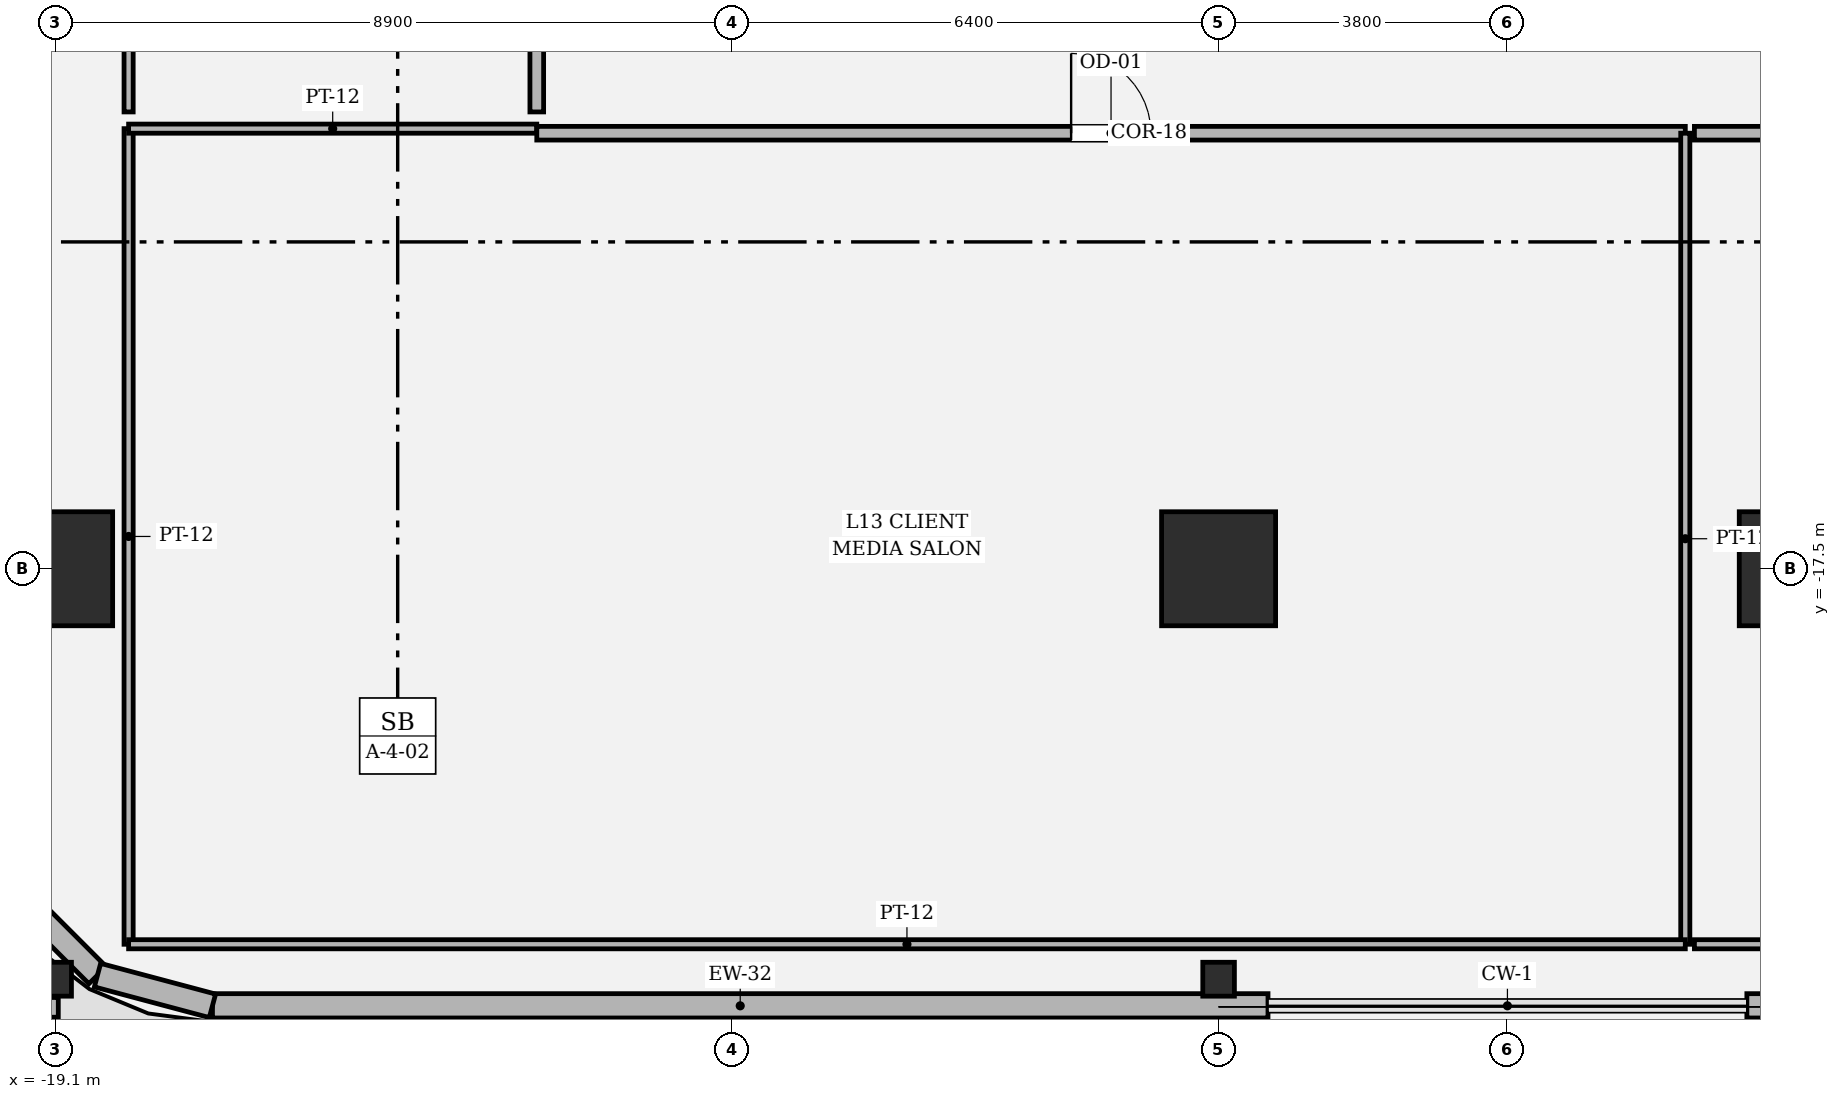
"""IFC4 building model, lengths in metres.
Left out: names, types, materials, properties, quantities, classifications, styles, units other than length and angle.
Written with IfcOpenShell. Run it as: python <this file> out.ifc"""

import sys

from ifc_helpers import new_model, si_unit, direction, frame, frame_2d, origin, origin_2d, place, context, subcontext, project, spatial, rectangle, hollow_rectangle, i_section, extrude, element, fill, save


model = new_model("IFC4")
c1 = context("Model", 3, precision=1e-05, world=origin(), true_north=direction((0.0, 1.0)))
c2 = subcontext(c1, "Body", "Model", "MODEL_VIEW")
j1 = project(units=[si_unit("LENGTHUNIT", "METRE"), si_unit("PLANEANGLEUNIT", "RADIAN")], contexts=[c1])
p1 = place(None, origin())
s1 = spatial("IfcSite", under=j1, at=p1, CompositionType="ELEMENT")
p2 = place(p1, origin())
s2 = spatial("IfcBuilding", under=s1, at=p2, CompositionType="ELEMENT")
p3 = place(p2, frame((0.0, 0.0, 60.6)))
s3 = spatial("IfcBuildingStorey", under=s2, at=p3, CompositionType="ELEMENT", Elevation=60.6)
for number, where, z_axis, x_axis in (
    (1, (-19.1, -17.5, 0.0), (0.0, 0.0, 1.0), (1.0, 0.0, 0.0)),
    (2, (-3.8, -17.5, 0.0), (0.0, 0.0, 1.0), (1.0, 0.0, 0.0)),
    (3, (3.8, -17.5, 0.0), (0.0, 0.0, 1.0), (1.0, 0.0, 0.0)),
):
    element("IfcColumn", number, at=place(p3, frame(where, z_axis=z_axis, x_axis=x_axis)), inside=s3, PredefinedType="COLUMN", context=c2, shape_type="SweptSolid", body=[
        extrude(hollow_rectangle(XDim=1.5, YDim=1.5, WallThickness=0.045, at=origin_2d()), origin(), (0.0, 0.0, 1.0), 4.05),
    ])
for number, where, z_axis, x_axis in (
    (4, (-19.1, -22.9, 0.0), (0.0, 0.0, 1.0), (1.0, 0.0, 0.0)),
    (5, (-3.8, -22.9, 0.0), (0.0, 0.0, 1.0), (1.0, 0.0, 0.0)),
):
    element("IfcColumn", number, at=place(p3, frame(where, z_axis=z_axis, x_axis=x_axis)), inside=s3, PredefinedType="COLUMN", context=c2, shape_type="SweptSolid", body=[
        extrude(i_section(OverallWidth=0.416, OverallDepth=0.446, WebThickness=0.039, FlangeThickness=0.062, FilletRadius=0.018, at=origin_2d()), origin(), (0.0, 0.0, 1.0), 4.048),
    ])
p4 = place(p3, frame((-17.037, -23.25, 0.0), z_axis=(0.0, 0.0, 1.0), x_axis=(1.0, 0.0, 0.0)))
e6 = element("IfcWall", 6, at=p4, inside=s3, PredefinedType="SOLIDWALL", context=c2, shape_type="SweptSolid", body=[
    extrude(rectangle(XDim=13.887, YDim=0.32, at=frame_2d((6.943, 0.0))), origin(), (0.0, 0.0, 1.0), 2.524),
])
p5 = place(p3, frame((3.15, -23.25, 0.0), z_axis=(0.0, 0.0, 1.0), x_axis=(1.0, 0.0, 0.0)))
e7 = element("IfcWall", 7, at=p5, inside=s3, PredefinedType="SOLIDWALL", context=c2, shape_type="SweptSolid", body=[
    extrude(rectangle(XDim=18.687, YDim=0.32, at=frame_2d((9.344, 0.0))), origin(), (0.0, 0.0, 1.0), 2.524),
])
p6 = place(p3, frame((-19.646, -21.749, 0.0), z_axis=(0.0, 0.0, 1.0), x_axis=(0.707028130747, -0.707185422879, 0.0)))
e8 = element("IfcWall", 8, at=p6, inside=s3, PredefinedType="SOLIDWALL", context=c2, shape_type="SweptSolid", body=[
    extrude(rectangle(XDim=1.552, YDim=0.32, at=frame_2d((0.776, 0.0))), origin(), (0.0, 0.0, 1.0), 2.484),
])
p7 = place(p3, frame((-18.549, -22.847, 0.0), z_axis=(0.0, 0.0, 1.0), x_axis=(0.966224582397, -0.257701486942, 0.0)))
e9 = element("IfcWall", 9, at=p7, inside=s3, PredefinedType="SOLIDWALL", context=c2, shape_type="SweptSolid", body=[
    extrude(rectangle(XDim=1.565, YDim=0.32, at=frame_2d((0.783, 0.0))), origin(), (0.0, 0.0, 1.0), 2.524),
])
p8 = place(p3, frame((-21.838, -23.27, 0.0), z_axis=(0.0, 0.0, 1.0), x_axis=(1.0, 0.0, 0.0)))
e10 = element("IfcWall", 10, at=p8, inside=s3, PredefinedType="PARAPET", context=c2, shape_type="SweptSolid", body=[
    extrude(rectangle(XDim=2.773, YDim=0.26, at=frame_2d((1.386, 0.0))), origin(), (0.0, 0.0, 1.0), 1.2),
])
p9 = place(p3, frame((-18.14, -22.44, 0.0), z_axis=(0.0, 0.0, 1.0), x_axis=(0.0, 1.0, 0.0)))
e11 = element("IfcWall", 11, at=p9, inside=s3, PredefinedType="PARTITIONING", context=c2, shape_type="SweptSolid", body=[
    extrude(rectangle(XDim=10.73, YDim=0.12, at=frame_2d((5.365, 0.0))), origin(), (0.0, 0.0, 1.0), 3.104),
])
p10 = place(p3, frame((-18.14, -11.71, 0.0), z_axis=(0.0, 0.0, 1.0), x_axis=(1.0, 0.0, 0.0)))
e12 = element("IfcWall", 12, at=p10, inside=s3, PredefinedType="PARTITIONING", context=c2, shape_type="SweptSolid", body=[
    extrude(rectangle(XDim=5.37, YDim=0.12, at=frame_2d((2.685, 0.0))), origin(), (0.0, 0.0, 1.0), 3.354),
])
p11 = place(p3, frame((-12.77, -11.77, 0.0), z_axis=(0.0, 0.0, 1.0), x_axis=(1.0, 0.0, 0.0)))
e13 = element("IfcWall", 13, at=p11, inside=s3, PredefinedType="PARTITIONING", context=c2, shape_type="SweptSolid", body=[
    extrude(rectangle(XDim=15.11, YDim=0.18, at=frame_2d((7.555, 0.0))), origin(), (0.0, 0.0, 1.0), 3.104),
])
p12 = place(p11, frame((7.03, 0.0, 0.0)))
e14 = element("IfcOpeningElement", 14, at=p12, cuts=e13, PredefinedType="OPENING", context=c2, shape_type="SweptSolid", body=[
    extrude(rectangle(XDim=1.05, YDim=2.2, at=frame_2d((0.525, 1.1))), frame((0.0, 0.1, 0.0), z_axis=(0.0, -1.0, 0.0), x_axis=(1.0, 0.0, 0.0)), (0.0, 0.0, 1.0), 0.2),
])
p13 = place(p3, frame((2.34, -11.77, 0.0), z_axis=(0.0, 0.0, 1.0), x_axis=(0.0, -1.0, 0.0)))
e15 = element("IfcWall", 15, at=p13, inside=s3, PredefinedType="PARTITIONING", context=c2, shape_type="SweptSolid", body=[
    extrude(rectangle(XDim=10.67, YDim=0.12, at=frame_2d((5.335, 0.0))), origin(), (0.0, 0.0, 1.0), 3.104),
])
p14 = place(p3, frame((2.34, -22.44, 0.0), z_axis=(0.0, 0.0, 1.0), x_axis=(-1.0, 0.0, 0.0)))
e16 = element("IfcWall", 16, at=p14, inside=s3, PredefinedType="PARTITIONING", context=c2, shape_type="SweptSolid", body=[
    extrude(rectangle(XDim=20.48, YDim=0.12, at=frame_2d((10.24, 0.0))), origin(), (0.0, 0.0, 1.0), 2.484),
])
p15 = place(p3, frame((2.46, -11.77, 0.0), z_axis=(0.0, 0.0, 1.0), x_axis=(1.0, 0.0, 0.0)))
e17 = element("IfcWall", 17, at=p15, inside=s3, PredefinedType="PARTITIONING", context=c2, shape_type="SweptSolid", body=[
    extrude(rectangle(XDim=10.31, YDim=0.18, at=frame_2d((5.155, 0.0))), origin(), (0.0, 0.0, 1.0), 3.104),
])
p16 = place(p15, frame((4.455, 0.0, 0.0)))
e18 = element("IfcOpeningElement", 18, at=p16, cuts=e17, PredefinedType="OPENING", context=c2, shape_type="SweptSolid", body=[
    extrude(rectangle(XDim=1.4, YDim=2.25, at=frame_2d((0.7, 1.125))), frame((0.0, 0.1, 0.0), z_axis=(0.0, -1.0, 0.0), x_axis=(1.0, 0.0, 0.0)), (0.0, 0.0, 1.0), 0.2),
])
p17 = place(p3, frame((23.748, -22.44, 0.0), z_axis=(0.0, 0.0, 1.0), x_axis=(-1.0, 0.0, 0.0)))
e19 = element("IfcWall", 19, at=p17, inside=s3, PredefinedType="PARTITIONING", context=c2, shape_type="SweptSolid", body=[
    extrude(rectangle(XDim=21.288, YDim=0.12, at=frame_2d((10.644, 0.0))), origin(), (0.0, 0.0, 1.0), 2.484),
])
p18 = place(p3, frame((-12.77, -4.218, 0.0), z_axis=(0.0, 0.0, 1.0), x_axis=(0.0, -1.0, 0.0)))
e20 = element("IfcWall", 20, at=p18, inside=s3, PredefinedType="PARTITIONING", context=c2, shape_type="SweptSolid", body=[
    extrude(rectangle(XDim=7.272, YDim=0.18, at=frame_2d((3.636, 0.0))), origin(), (0.0, 0.0, 1.0), 3.104),
])
p19 = place(p18, frame((3.111, 0.0, 0.0)))
e21 = element("IfcOpeningElement", 21, at=p19, cuts=e20, PredefinedType="OPENING", context=c2, shape_type="SweptSolid", body=[
    extrude(rectangle(XDim=1.05, YDim=2.2, at=frame_2d((0.525, 1.1))), frame((0.0, 0.1, 0.0), z_axis=(0.0, -1.0, 0.0), x_axis=(1.0, 0.0, 0.0)), (0.0, 0.0, 1.0), 0.2),
])
p20 = place(p3, frame((-18.14, -11.49, 0.0), z_axis=(0.0, 0.0, 1.0), x_axis=(0.0, 1.0, 0.0)))
e22 = element("IfcWall", 22, at=p20, inside=s3, PredefinedType="PARTITIONING", context=c2, shape_type="SweptSolid", body=[
    extrude(rectangle(XDim=7.272, YDim=0.12, at=frame_2d((3.636, 0.0))), origin(), (0.0, 0.0, 1.0), 3.104),
])
p21 = place(p12, origin())
e23 = element("IfcDoor", 23, at=p21, inside=s3, OperationType="SINGLE_SWING_LEFT", PredefinedType="DOOR", context=c2, shape_type="SweptSolid", body=[
    extrude(rectangle(XDim=1.05, YDim=2.2, at=frame_2d((0.525, 1.1))), frame((0.0, 0.025, 0.0), z_axis=(0.0, -1.0, 0.0), x_axis=(1.0, 0.0, 0.0)), (0.0, 0.0, 1.0), 0.05),
])
fill(e14, e23)
save(model, sys.argv[1])
